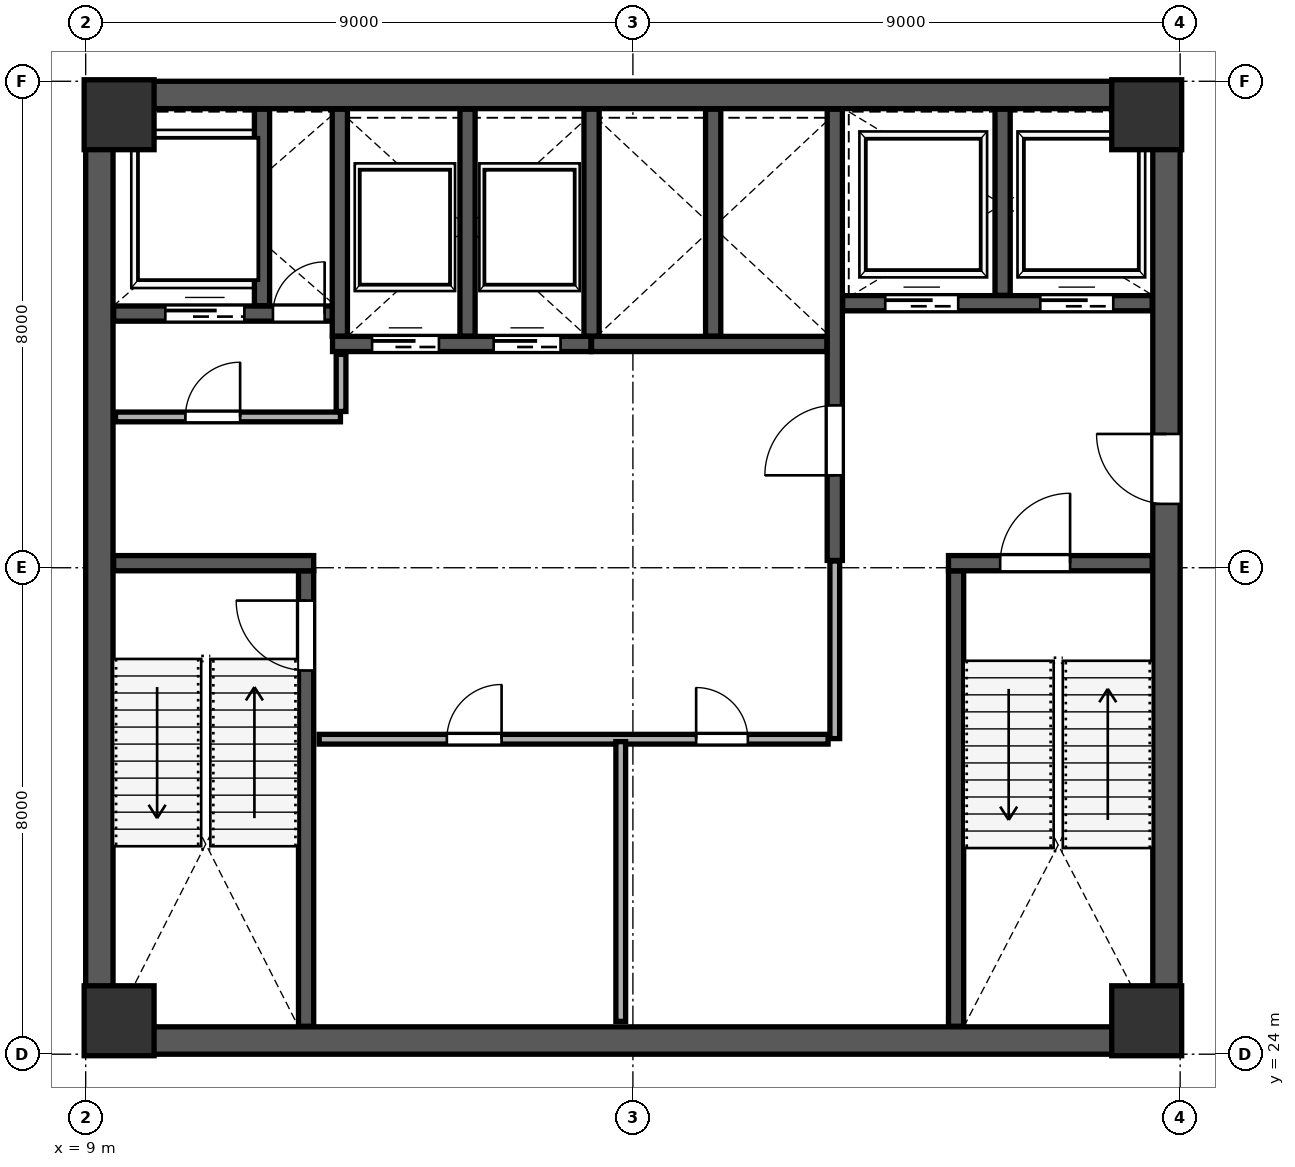
"""IFC4 building model, lengths in metres.
Left out: names, types, materials, properties, quantities, classifications, styles, units other than length and angle.
Written with IfcOpenShell. Run it as: python <this file> out.ifc"""

import sys

from ifc_helpers import new_model, si_unit, direction, frame, frame_2d, origin, origin_2d, place, context, subcontext, project, spatial, rectangle, extrude, source, transform, mapped, element, fill, save


model = new_model("IFC4")
c1 = context("Model", 3, precision=1e-05, world=origin(), true_north=direction((0.0, 1.0)))
c2 = subcontext(c1, "Body", "Model", "MODEL_VIEW")
j1 = project(units=[si_unit("LENGTHUNIT", "METRE"), si_unit("PLANEANGLEUNIT", "RADIAN")], contexts=[c1])
p1 = place(None, origin())
s1 = spatial("IfcSite", under=j1, at=p1, CompositionType="ELEMENT")
p2 = place(p1, origin())
s2 = spatial("IfcBuilding", under=s1, at=p2, CompositionType="ELEMENT")
p3 = place(p2, frame((0.0, 0.0, 137.2)))
s3 = spatial("IfcBuildingStorey", under=s2, at=p3, CompositionType="ELEMENT", Elevation=137.2)
m1 = source(origin(), c2, "Body", "SweptSolid", [
    extrude(rectangle(XDim=1.15, YDim=1.15, at=origin_2d()), origin(), (0.0, 0.0, 1.0), 4.198),
])
for number, where, z_axis, x_axis in (
    (1, (9.55, 24.55, 0.001), (0.0, 0.0, 1.0), (1.0, 0.0, 0.0)),
    (2, (26.45, 24.55, 0.001), (0.0, 0.0, 1.0), (1.0, 0.0, 0.0)),
    (3, (9.55, 39.45, 0.001), (0.0, 0.0, 1.0), (1.0, 0.0, 0.0)),
    (4, (26.45, 39.45, 0.001), (0.0, 0.0, 1.0), (1.0, 0.0, 0.0)),
):
    element("IfcColumn", number, at=place(p3, frame(where, z_axis=z_axis, x_axis=x_axis)), inside=s3, PredefinedType="COLUMN", context=c2, shape_type="MappedRepresentation", body=[
        mapped(m1, transform((0.0, 0.0, 0.0), scale=1.0)),
    ])
p4 = place(p3, frame((9.225, 24.45, 0.0), z_axis=(0.0, 0.0, 1.0), x_axis=(0.0, 1.0, 0.0)))
e5 = element("IfcWall", 5, at=p4, inside=s3, PredefinedType="SHEAR", context=c2, shape_type="SweptSolid", body=[
    extrude(rectangle(XDim=15.1, YDim=0.45, at=frame_2d((7.55, 0.0))), origin(), (0.0, 0.0, 1.0), 3.96),
])
p5 = place(p3, frame((26.775, 24.45, 0.0), z_axis=(0.0, 0.0, 1.0), x_axis=(0.0, 1.0, 0.0)))
e6 = element("IfcWall", 6, at=p5, inside=s3, PredefinedType="SHEAR", context=c2, shape_type="SweptSolid", body=[
    extrude(rectangle(XDim=15.1, YDim=0.45, at=frame_2d((7.55, 0.0))), origin(), (0.0, 0.0, 1.0), 3.96),
])
p6 = place(p5, frame((8.6, 0.0, 0.0)))
e7 = element("IfcOpeningElement", 7, at=p6, cuts=e6, PredefinedType="OPENING", context=c2, shape_type="SweptSolid", body=[
    extrude(rectangle(XDim=1.15, YDim=2.2, at=frame_2d((0.575, 1.1))), frame((0.0, 0.235, 0.0), z_axis=(0.0, -1.0, 0.0), x_axis=(1.0, 0.0, 0.0)), (0.0, 0.0, 1.0), 0.47),
])
for number, where, z_axis, x_axis in (
    (8, (9.0, 24.225, 0.0), (0.0, 0.0, 1.0), (1.0, 0.0, 0.0)),
    (9, (9.0, 39.775, 0.0), (0.0, 0.0, 1.0), (1.0, 0.0, 0.0)),
):
    element("IfcWall", number, at=place(p3, frame(where, z_axis=z_axis, x_axis=x_axis)), inside=s3, PredefinedType="SHEAR", context=c2, shape_type="SweptSolid", body=[
        extrude(rectangle(XDim=18.0, YDim=0.45, at=frame_2d((9.0, 0.0))), origin(), (0.0, 0.0, 1.0), 3.96),
    ])
p7 = place(p3, frame((12.625, 24.46, 0.0), z_axis=(0.0, 0.0, 1.0), x_axis=(0.0, 1.0, 0.0)))
e10 = element("IfcWall", 10, at=p7, inside=s3, PredefinedType="SHEAR", context=c2, shape_type="SweptSolid", body=[
    extrude(rectangle(XDim=7.49, YDim=0.25, at=frame_2d((3.745, 0.0))), origin(), (0.0, 0.0, 1.0), 3.96),
])
p8 = place(p7, frame((5.85, 0.0, 0.0)))
e11 = element("IfcOpeningElement", 11, at=p8, cuts=e10, PredefinedType="OPENING", context=c2, shape_type="SweptSolid", body=[
    extrude(rectangle(XDim=1.15, YDim=2.2, at=frame_2d((0.575, 1.1))), frame((0.0, 0.135, 0.0), z_axis=(0.0, -1.0, 0.0), x_axis=(1.0, 0.0, 0.0)), (0.0, 0.0, 1.0), 0.27),
])
p9 = place(p3, frame((9.46, 32.075, 0.0), z_axis=(0.0, 0.0, 1.0), x_axis=(1.0, 0.0, 0.0)))
e12 = element("IfcWall", 12, at=p9, inside=s3, PredefinedType="SHEAR", context=c2, shape_type="SweptSolid", body=[
    extrude(rectangle(XDim=3.29, YDim=0.25, at=frame_2d((1.645, 0.0))), origin(), (0.0, 0.0, 1.0), 3.96),
])
p10 = place(p3, frame((23.315, 24.46, 0.0), z_axis=(0.0, 0.0, 1.0), x_axis=(0.0, 1.0, 0.0)))
e13 = element("IfcWall", 13, at=p10, inside=s3, PredefinedType="SHEAR", context=c2, shape_type="SweptSolid", body=[
    extrude(rectangle(XDim=7.49, YDim=0.25, at=frame_2d((3.745, 0.0))), origin(), (0.0, 0.0, 1.0), 3.96),
])
p11 = place(p3, frame((23.19, 32.075, 0.0), z_axis=(0.0, 0.0, 1.0), x_axis=(1.0, 0.0, 0.0)))
e14 = element("IfcWall", 14, at=p11, inside=s3, PredefinedType="SHEAR", context=c2, shape_type="SweptSolid", body=[
    extrude(rectangle(XDim=3.35, YDim=0.25, at=frame_2d((1.675, 0.0))), origin(), (0.0, 0.0, 1.0), 3.96),
])
p12 = place(p11, frame((0.85, 0.0, 0.0)))
e15 = element("IfcOpeningElement", 15, at=p12, cuts=e14, PredefinedType="OPENING", context=c2, shape_type="SweptSolid", body=[
    extrude(rectangle(XDim=1.15, YDim=2.2, at=frame_2d((0.575, 1.1))), frame((0.0, 0.135, 0.0), z_axis=(0.0, -1.0, 0.0), x_axis=(1.0, 0.0, 0.0)), (0.0, 0.0, 1.0), 0.27),
])
p13 = place(p3, frame((21.32, 32.12, 0.0), z_axis=(0.0, 0.0, 1.0), x_axis=(0.0, 1.0, 0.0)))
e16 = element("IfcWall", 16, at=p13, inside=s3, PredefinedType="SHEAR", context=c2, shape_type="SweptSolid", body=[
    extrude(rectangle(XDim=7.42, YDim=0.25, at=frame_2d((3.71, 0.0))), origin(), (0.0, 0.0, 1.0), 3.96),
])
p14 = place(p13, frame((1.4, 0.0, 0.0)))
e17 = element("IfcOpeningElement", 17, at=p14, cuts=e16, PredefinedType="OPENING", context=c2, shape_type="SweptSolid", body=[
    extrude(rectangle(XDim=1.15, YDim=2.2, at=frame_2d((0.575, 1.1))), frame((0.0, 0.135, 0.0), z_axis=(0.0, -1.0, 0.0), x_axis=(1.0, 0.0, 0.0)), (0.0, 0.0, 1.0), 0.27),
])
p15 = place(p3, frame((9.46, 36.18, 0.0), z_axis=(0.0, 0.0, 1.0), x_axis=(1.0, 0.0, 0.0)))
e18 = element("IfcWall", 18, at=p15, inside=s3, PredefinedType="SHEAR", context=c2, shape_type="SweptSolid", body=[
    extrude(rectangle(XDim=3.79, YDim=0.25, at=frame_2d((1.895, 0.0))), origin(), (0.0, 0.0, 1.0), 3.96),
])
p16 = place(p15, frame((2.62, 0.0, 0.0)))
e19 = element("IfcOpeningElement", 19, at=p16, cuts=e18, PredefinedType="OPENING", context=c2, shape_type="SweptSolid", body=[
    extrude(rectangle(XDim=0.85, YDim=2.1, at=frame_2d((0.425, 1.05))), frame((0.0, 0.135, 0.0), z_axis=(0.0, -1.0, 0.0), x_axis=(1.0, 0.0, 0.0)), (0.0, 0.0, 1.0), 0.27),
])
p17 = place(p15, frame((0.85, 0.0, 0.0)))
e20 = element("IfcOpeningElement", 20, at=p17, cuts=e18, PredefinedType="OPENING", context=c2, shape_type="SweptSolid", body=[
    extrude(rectangle(XDim=1.3, YDim=2.25, at=frame_2d((0.65, 1.125))), frame((0.0, 0.135, 0.0), z_axis=(0.0, -1.0, 0.0), x_axis=(1.0, 0.0, 0.0)), (0.0, 0.0, 1.0), 0.27),
])
p18 = place(p3, frame((11.9, 36.31, 0.0), z_axis=(0.0, 0.0, 1.0), x_axis=(0.0, 1.0, 0.0)))
e21 = element("IfcWall", 21, at=p18, inside=s3, PredefinedType="SHEAR", context=c2, shape_type="SweptSolid", body=[
    extrude(rectangle(XDim=3.23, YDim=0.25, at=frame_2d((1.615, 0.0))), origin(), (0.0, 0.0, 1.0), 3.96),
])
p19 = place(p3, frame((21.45, 36.35, 0.0), z_axis=(0.0, 0.0, 1.0), x_axis=(1.0, 0.0, 0.0)))
e22 = element("IfcWall", 22, at=p19, inside=s3, PredefinedType="SHEAR", context=c2, shape_type="SweptSolid", body=[
    extrude(rectangle(XDim=5.09, YDim=0.25, at=frame_2d((2.545, 0.0))), origin(), (0.0, 0.0, 1.0), 3.96),
])
p20 = place(p19, frame((0.7, 0.0, 0.0)))
e23 = element("IfcOpeningElement", 23, at=p20, cuts=e22, PredefinedType="OPENING", context=c2, shape_type="SweptSolid", body=[
    extrude(rectangle(XDim=1.2, YDim=2.2, at=frame_2d((0.6, 1.1))), frame((0.0, 0.135, 0.0), z_axis=(0.0, -1.0, 0.0), x_axis=(1.0, 0.0, 0.0)), (0.0, 0.0, 1.0), 0.27),
])
p21 = place(p19, frame((3.25, 0.0, 0.0)))
e24 = element("IfcOpeningElement", 24, at=p21, cuts=e22, PredefinedType="OPENING", context=c2, shape_type="SweptSolid", body=[
    extrude(rectangle(XDim=1.2, YDim=2.2, at=frame_2d((0.6, 1.1))), frame((0.0, 0.135, 0.0), z_axis=(0.0, -1.0, 0.0), x_axis=(1.0, 0.0, 0.0)), (0.0, 0.0, 1.0), 0.27),
])
p22 = place(p3, frame((24.08, 36.48, 0.0), z_axis=(0.0, 0.0, 1.0), x_axis=(0.0, 1.0, 0.0)))
e25 = element("IfcWall", 25, at=p22, inside=s3, PredefinedType="SHEAR", context=c2, shape_type="SweptSolid", body=[
    extrude(rectangle(XDim=3.06, YDim=0.25, at=frame_2d((1.53, 0.0))), origin(), (0.0, 0.0, 1.0), 3.96),
])
p23 = place(p3, frame((13.06, 35.68, 0.0), z_axis=(0.0, 0.0, 1.0), x_axis=(1.0, 0.0, 0.0)))
e26 = element("IfcWall", 26, at=p23, inside=s3, PredefinedType="SHEAR", context=c2, shape_type="SweptSolid", body=[
    extrude(rectangle(XDim=4.25, YDim=0.25, at=frame_2d((2.125, 0.0))), origin(), (0.0, 0.0, 1.0), 3.96),
])
p24 = place(p23, frame((0.65, 0.0, 0.0)))
e27 = element("IfcOpeningElement", 27, at=p24, cuts=e26, PredefinedType="OPENING", context=c2, shape_type="SweptSolid", body=[
    extrude(rectangle(XDim=1.1, YDim=2.2, at=frame_2d((0.55, 1.1))), frame((0.0, 0.135, 0.0), z_axis=(0.0, -1.0, 0.0), x_axis=(1.0, 0.0, 0.0)), (0.0, 0.0, 1.0), 0.27),
])
p25 = place(p23, frame((2.65, 0.0, 0.0)))
e28 = element("IfcOpeningElement", 28, at=p25, cuts=e26, PredefinedType="OPENING", context=c2, shape_type="SweptSolid", body=[
    extrude(rectangle(XDim=1.1, YDim=2.2, at=frame_2d((0.55, 1.1))), frame((0.0, 0.135, 0.0), z_axis=(0.0, -1.0, 0.0), x_axis=(1.0, 0.0, 0.0)), (0.0, 0.0, 1.0), 0.27),
])
for number, where, z_axis, x_axis in (
    (29, (13.18, 35.81, 0.0), (0.0, 0.0, 1.0), (0.0, 1.0, 0.0)),
    (30, (15.28, 35.81, 0.0), (0.0, 0.0, 1.0), (0.0, 1.0, 0.0)),
):
    element("IfcWall", number, at=place(p3, frame(where, z_axis=z_axis, x_axis=x_axis)), inside=s3, PredefinedType="SHEAR", context=c2, shape_type="SweptSolid", body=[
        extrude(rectangle(XDim=3.73, YDim=0.25, at=frame_2d((1.865, 0.0))), origin(), (0.0, 0.0, 1.0), 3.96),
    ])
p26 = place(p3, frame((17.32, 35.68, 0.0), z_axis=(0.0, 0.0, 1.0), x_axis=(1.0, 0.0, 0.0)))
e31 = element("IfcWall", 31, at=p26, inside=s3, PredefinedType="SHEAR", context=c2, shape_type="SweptSolid", body=[
    extrude(rectangle(XDim=3.87, YDim=0.25, at=frame_2d((1.935, 0.0))), origin(), (0.0, 0.0, 1.0), 3.96),
])
for number, where, z_axis, x_axis in (
    (32, (17.32, 35.81, 0.0), (0.0, 0.0, 1.0), (0.0, 1.0, 0.0)),
    (33, (19.32, 35.81, 0.0), (0.0, 0.0, 1.0), (0.0, 1.0, 0.0)),
):
    element("IfcWall", number, at=place(p3, frame(where, z_axis=z_axis, x_axis=x_axis)), inside=s3, PredefinedType="SHEAR", context=c2, shape_type="SweptSolid", body=[
        extrude(rectangle(XDim=3.73, YDim=0.25, at=frame_2d((1.865, 0.0))), origin(), (0.0, 0.0, 1.0), 3.96),
    ])
p27 = place(p3, frame((9.49, 34.48, 0.0), z_axis=(0.0, 0.0, 1.0), x_axis=(1.0, 0.0, 0.0)))
e34 = element("IfcWall", 34, at=p27, inside=s3, PredefinedType="PARTITIONING", context=c2, shape_type="SweptSolid", body=[
    extrude(rectangle(XDim=3.7, YDim=0.16, at=frame_2d((1.85, 0.0))), origin(), (0.0, 0.0, 1.0), 3.96),
])
p28 = place(p27, frame((1.15, 0.0, 0.0)))
e35 = element("IfcOpeningElement", 35, at=p28, cuts=e34, PredefinedType="OPENING", context=c2, shape_type="SweptSolid", body=[
    extrude(rectangle(XDim=0.9, YDim=2.15, at=frame_2d((0.45, 1.075))), frame((0.0, 0.09, 0.0), z_axis=(0.0, -1.0, 0.0), x_axis=(1.0, 0.0, 0.0)), (0.0, 0.0, 1.0), 0.18),
])
p29 = place(p3, frame((13.2, 34.57, 0.0), z_axis=(0.0, 0.0, 1.0), x_axis=(0.0, 1.0, 0.0)))
e36 = element("IfcWall", 36, at=p29, inside=s3, PredefinedType="PARTITIONING", context=c2, shape_type="SweptSolid", body=[
    extrude(rectangle(XDim=0.94, YDim=0.16, at=frame_2d((0.47, 0.0))), origin(), (0.0, 0.0, 1.0), 3.96),
])
p30 = place(p3, frame((12.84, 29.18, 0.0), z_axis=(0.0, 0.0, 1.0), x_axis=(1.0, 0.0, 0.0)))
e37 = element("IfcWall", 37, at=p30, inside=s3, PredefinedType="PARTITIONING", context=c2, shape_type="SweptSolid", body=[
    extrude(rectangle(XDim=8.37, YDim=0.16, at=frame_2d((4.185, 0.0))), origin(), (0.0, 0.0, 1.0), 3.96),
])
p31 = place(p30, frame((2.1, 0.0, 0.0)))
e38 = element("IfcOpeningElement", 38, at=p31, cuts=e37, PredefinedType="OPENING", context=c2, shape_type="SweptSolid", body=[
    extrude(rectangle(XDim=0.9, YDim=2.15, at=frame_2d((0.45, 1.075))), frame((0.0, 0.09, 0.0), z_axis=(0.0, -1.0, 0.0), x_axis=(1.0, 0.0, 0.0)), (0.0, 0.0, 1.0), 0.18),
])
p32 = place(p30, frame((6.2, 0.0, 0.0)))
e39 = element("IfcOpeningElement", 39, at=p32, cuts=e37, PredefinedType="OPENING", context=c2, shape_type="SweptSolid", body=[
    extrude(rectangle(XDim=0.85, YDim=2.1, at=frame_2d((0.425, 1.05))), frame((0.0, 0.09, 0.0), z_axis=(0.0, -1.0, 0.0), x_axis=(1.0, 0.0, 0.0)), (0.0, 0.0, 1.0), 0.18),
])
p33 = place(p3, frame((17.8, 24.54, 0.0), z_axis=(0.0, 0.0, 1.0), x_axis=(0.0, 1.0, 0.0)))
e40 = element("IfcWall", 40, at=p33, inside=s3, PredefinedType="PARTITIONING", context=c2, shape_type="SweptSolid", body=[
    extrude(rectangle(XDim=4.6, YDim=0.16, at=frame_2d((2.3, 0.0))), origin(), (0.0, 0.0, 1.0), 3.96),
])
p34 = place(p3, frame((21.32, 29.19, 0.0), z_axis=(0.0, 0.0, 1.0), x_axis=(0.0, 1.0, 0.0)))
e41 = element("IfcWall", 41, at=p34, inside=s3, PredefinedType="PARTITIONING", context=c2, shape_type="SweptSolid", body=[
    extrude(rectangle(XDim=2.92, YDim=0.16, at=frame_2d((1.46, 0.0))), origin(), (0.0, 0.0, 1.0), 3.96),
])
p35 = place(p3, frame((10.184, 47.719, 0.0), z_axis=(0.0, 0.0, 1.0), x_axis=(0.939691432235, -0.342023408826, 0.0)))
e42 = element("IfcWall", 42, at=p35, inside=s3, PredefinedType="PARTITIONING", context=c2, shape_type="SweptSolid", body=[
    extrude(rectangle(XDim=25.87, YDim=0.135, at=frame_2d((12.935, 0.0))), origin(), (0.0, 0.0, 1.0), 3.96),
])
p36 = place(p35, frame((18.8, 0.0, 0.0)))
e43 = element("IfcOpeningElement", 43, at=p36, cuts=e42, PredefinedType="OPENING", context=c2, shape_type="SweptSolid", body=[
    extrude(rectangle(XDim=0.95, YDim=2.15, at=frame_2d((0.475, 1.075))), frame((0.0, 0.078, 0.0), z_axis=(0.0, -1.0, 0.0), x_axis=(1.0, 0.0, 0.0)), (0.0, 0.0, 1.0), 0.155),
])
p37 = place(p3, frame((2.362, 26.345, 0.0), z_axis=(0.0, 0.0, 1.0), x_axis=(0.342021727767, 0.939692044095, 0.0)))
e44 = element("IfcWall", 44, at=p37, inside=s3, PredefinedType="PARTITIONING", context=c2, shape_type="SweptSolid", body=[
    extrude(rectangle(XDim=22.72, YDim=0.1, at=frame_2d((11.36, 0.0))), origin(), (0.0, 0.0, 1.0), 3.96),
])
p38 = place(p37, frame((6.2, 0.0, 0.0)))
e45 = element("IfcOpeningElement", 45, at=p38, cuts=e44, PredefinedType="OPENING", context=c2, shape_type="SweptSolid", body=[
    extrude(rectangle(XDim=0.95, YDim=2.15, at=frame_2d((0.475, 1.075))), frame((0.0, 0.06, 0.0), z_axis=(0.0, -1.0, 0.0), x_axis=(1.0, 0.0, 0.0)), (0.0, 0.0, 1.0), 0.12),
])
p39 = place(p3, frame((24.64, 11.681, 0.0), z_axis=(0.0, 0.0, 1.0), x_axis=(0.342014151498, 0.939694801611, 0.0)))
e46 = element("IfcWall", 46, at=p39, inside=s3, PredefinedType="PARTITIONING", context=c2, shape_type="SweptSolid", body=[
    extrude(rectangle(XDim=20.68, YDim=0.16, at=frame_2d((10.34, 0.0))), origin(), (0.0, 0.0, 1.0), 3.96),
])
m2 = source(origin(), c2, "Body", "SweptSolid", [
    extrude(rectangle(XDim=1.15, YDim=2.2, at=frame_2d((0.575, 1.1))), frame((0.0, 0.025, 0.0), z_axis=(0.0, -1.0, 0.0), x_axis=(1.0, 0.0, 0.0)), (0.0, 0.0, 1.0), 0.05),
])
p40 = place(p8, origin())
e47 = element("IfcDoor", 47, at=p40, inside=s3, OperationType="SINGLE_SWING_RIGHT", PredefinedType="DOOR", context=c2, shape_type="MappedRepresentation", body=[
    mapped(m2, transform((0.0, 0.0, 0.0), scale=1.0)),
])
fill(e11, e47)
m3 = source(origin(), c2, "Body", "SweptSolid", [
    extrude(rectangle(XDim=1.15, YDim=2.2, at=frame_2d((0.575, 1.1))), frame((0.0, 0.025, 0.0), z_axis=(0.0, -1.0, 0.0), x_axis=(1.0, 0.0, 0.0)), (0.0, 0.0, 1.0), 0.05),
])
p41 = place(p14, origin())
e48 = element("IfcDoor", 48, at=p41, inside=s3, OperationType="SINGLE_SWING_LEFT", PredefinedType="DOOR", context=c2, shape_type="MappedRepresentation", body=[
    mapped(m3, transform((0.0, 0.0, 0.0), scale=1.0)),
])
fill(e17, e48)
p42 = place(p12, origin())
e49 = element("IfcDoor", 49, at=p42, inside=s3, OperationType="SINGLE_SWING_RIGHT", PredefinedType="DOOR", context=c2, shape_type="MappedRepresentation", body=[
    mapped(m2, transform((0.0, 0.0, 0.0), scale=1.0)),
])
fill(e15, e49)
p43 = place(p6, origin())
e50 = element("IfcDoor", 50, at=p43, inside=s3, OperationType="SINGLE_SWING_RIGHT", PredefinedType="DOOR", context=c2, shape_type="MappedRepresentation", body=[
    mapped(m3, transform((0.0, 0.0, 0.0), scale=1.0)),
])
fill(e7, e50)
m4 = source(origin(), c2, "Body", "SweptSolid", [
    extrude(rectangle(XDim=0.85, YDim=2.1, at=frame_2d((0.425, 1.05))), frame((0.0, 0.025, 0.0), z_axis=(0.0, -1.0, 0.0), x_axis=(1.0, 0.0, 0.0)), (0.0, 0.0, 1.0), 0.05),
])
p44 = place(p16, origin())
e51 = element("IfcDoor", 51, at=p44, inside=s3, OperationType="SINGLE_SWING_RIGHT", PredefinedType="DOOR", context=c2, shape_type="MappedRepresentation", body=[
    mapped(m4, transform((0.0, 0.0, 0.0), scale=1.0)),
])
fill(e19, e51)
m5 = source(origin(), c2, "Body", "SweptSolid", [
    extrude(rectangle(XDim=1.1, YDim=2.2, at=frame_2d((0.55, 1.1))), frame((0.0, 0.025, 0.0), z_axis=(0.0, -1.0, 0.0), x_axis=(1.0, 0.0, 0.0)), (0.0, 0.0, 1.0), 0.05),
])
p45 = place(p24, origin())
e52 = element("IfcDoor", 52, at=p45, inside=s3, OperationType="SLIDING_TO_LEFT", PredefinedType="DOOR", context=c2, shape_type="MappedRepresentation", body=[
    mapped(m5, transform((0.0, 0.0, 0.0), scale=1.0)),
])
fill(e27, e52)
p46 = place(p25, origin())
e53 = element("IfcDoor", 53, at=p46, inside=s3, OperationType="SLIDING_TO_RIGHT", PredefinedType="DOOR", context=c2, shape_type="MappedRepresentation", body=[
    mapped(m5, transform((0.0, 0.0, 0.0), scale=1.0)),
])
fill(e28, e53)
m6 = source(origin(), c2, "Body", "SweptSolid", [
    extrude(rectangle(XDim=1.2, YDim=2.2, at=frame_2d((0.6, 1.1))), frame((0.0, 0.025, 0.0), z_axis=(0.0, -1.0, 0.0), x_axis=(1.0, 0.0, 0.0)), (0.0, 0.0, 1.0), 0.05),
])
p47 = place(p20, origin())
e54 = element("IfcDoor", 54, at=p47, inside=s3, OperationType="SLIDING_TO_LEFT", PredefinedType="DOOR", context=c2, shape_type="MappedRepresentation", body=[
    mapped(m6, transform((0.0, 0.0, 0.0), scale=1.0)),
])
fill(e23, e54)
p48 = place(p21, origin())
e55 = element("IfcDoor", 55, at=p48, inside=s3, OperationType="SLIDING_TO_RIGHT", PredefinedType="DOOR", context=c2, shape_type="MappedRepresentation", body=[
    mapped(m6, transform((0.0, 0.0, 0.0), scale=1.0)),
])
fill(e24, e55)
m7 = source(origin(), c2, "Body", "SweptSolid", [
    extrude(rectangle(XDim=1.3, YDim=2.25, at=frame_2d((0.65, 1.125))), frame((0.0, 0.025, 0.0), z_axis=(0.0, -1.0, 0.0), x_axis=(1.0, 0.0, 0.0)), (0.0, 0.0, 1.0), 0.05),
])
p49 = place(p17, origin())
e56 = element("IfcDoor", 56, at=p49, inside=s3, OperationType="SLIDING_TO_LEFT", PredefinedType="DOOR", context=c2, shape_type="MappedRepresentation", body=[
    mapped(m7, transform((0.0, 0.0, 0.0), scale=1.0)),
])
fill(e20, e56)
m8 = source(origin(), c2, "Body", "SweptSolid", [
    extrude(rectangle(XDim=0.9, YDim=2.15, at=frame_2d((0.45, 1.075))), frame((0.0, 0.025, 0.0), z_axis=(0.0, -1.0, 0.0), x_axis=(1.0, 0.0, 0.0)), (0.0, 0.0, 1.0), 0.05),
])
p50 = place(p28, origin())
e57 = element("IfcDoor", 57, at=p50, inside=s3, OperationType="SINGLE_SWING_RIGHT", PredefinedType="DOOR", context=c2, shape_type="MappedRepresentation", body=[
    mapped(m8, transform((0.0, 0.0, 0.0), scale=1.0)),
])
fill(e35, e57)
p51 = place(p31, origin())
e58 = element("IfcDoor", 58, at=p51, inside=s3, OperationType="SINGLE_SWING_RIGHT", PredefinedType="DOOR", context=c2, shape_type="MappedRepresentation", body=[
    mapped(m8, transform((0.0, 0.0, 0.0), scale=1.0)),
])
fill(e38, e58)
p52 = place(p32, origin())
e59 = element("IfcDoor", 59, at=p52, inside=s3, OperationType="SINGLE_SWING_LEFT", PredefinedType="DOOR", context=c2, shape_type="MappedRepresentation", body=[
    mapped(m4, transform((0.0, 0.0, 0.0), scale=1.0)),
])
fill(e39, e59)
save(model, sys.argv[1])
